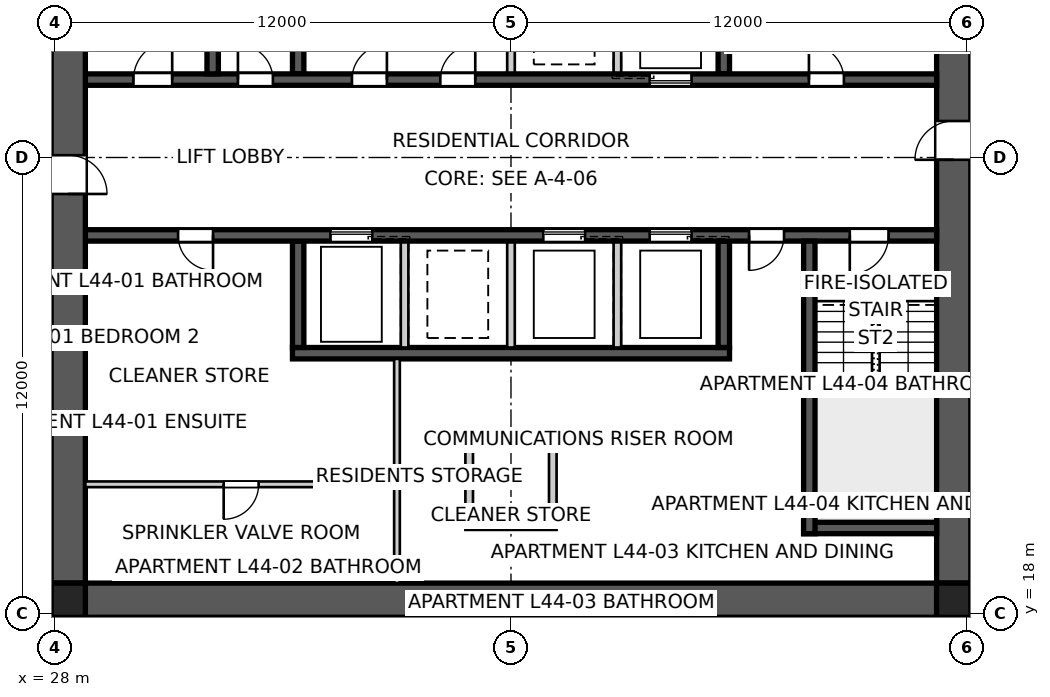
"""IFC4 building model, lengths in metres.
Left out: names, types, materials, properties, quantities, classifications, styles, units other than length and angle.
Written with IfcOpenShell. Run it as: python <this file> out.ifc"""

import sys

from ifc_helpers import new_model, si_unit, direction, frame, frame_2d, origin, origin_2d, place, context, subcontext, project, spatial, polyline, rectangle, outline, extrude, element, fill, save


model = new_model("IFC4")
c1 = context("Model", 3, precision=1e-05, world=origin(), true_north=direction((0.0, 1.0)))
c2 = subcontext(c1, "Body", "Model", "MODEL_VIEW")
j1 = project(units=[si_unit("LENGTHUNIT", "METRE"), si_unit("PLANEANGLEUNIT", "RADIAN")], contexts=[c1])
p1 = place(None, origin())
s1 = spatial("IfcSite", under=j1, at=p1, CompositionType="ELEMENT")
p2 = place(p1, origin())
s2 = spatial("IfcBuilding", under=s1, at=p2, CompositionType="ELEMENT")
p3 = place(p2, frame((0.0, 0.0, 160.8)))
s3 = spatial("IfcBuildingStorey", under=s2, at=p3, CompositionType="ELEMENT", Elevation=160.8)
p4 = place(p3, frame((51.2, 18.35, 0.0), z_axis=(0.0, 0.0, 1.0), x_axis=(-1.0, 0.0, 0.0)))
e1 = element("IfcWall", 1, at=p4, inside=s3, PredefinedType="SHEAR", context=c2, shape_type="SweptSolid", body=[
    extrude(outline(polyline([(0.0, -0.45), (22.4, -0.45), (22.4, -0.025), (22.85, -0.025), (22.85, 0.025), (22.4, 0.025), (22.4, 0.45), (0.0, 0.45), (0.0, 0.025), (-0.45, 0.025), (-0.45, -0.025), (0.0, -0.025), (0.0, -0.45)])), origin(), (0.0, 0.0, 1.0), 3.4),
])
p5 = place(p3, frame((51.65, 18.8, 0.0), z_axis=(0.0, 0.0, 1.0), x_axis=(0.0, 1.0, 0.0)))
e2 = element("IfcWall", 2, at=p5, inside=s3, PredefinedType="SHEAR", context=c2, shape_type="SweptSolid", body=[
    extrude(outline(polyline([(0.0, -0.45), (22.4, -0.45), (22.4, -0.025), (22.85, -0.025), (22.85, 0.025), (22.4, 0.025), (22.4, 0.45), (0.0, 0.45), (0.0, 0.025), (-0.45, 0.025), (-0.45, -0.025), (0.0, -0.025), (0.0, -0.45)])), origin(), (0.0, 0.0, 1.0), 3.4),
])
p6 = place(p5, frame((11.14, 0.0, 0.0)))
e3 = element("IfcOpeningElement", 3, at=p6, cuts=e2, PredefinedType="OPENING", context=c2, shape_type="SweptSolid", body=[
    extrude(rectangle(XDim=1.02, YDim=2.4, at=frame_2d((0.51, 1.2))), frame((0.0, 0.46, 0.0), z_axis=(0.0, -1.0, 0.0), x_axis=(1.0, 0.0, 0.0)), (0.0, 0.0, 1.0), 0.92),
])
p7 = place(p3, frame((28.35, 41.2, 0.0), z_axis=(0.0, 0.0, 1.0), x_axis=(0.0, -1.0, 0.0)))
e4 = element("IfcWall", 4, at=p7, inside=s3, PredefinedType="SHEAR", context=c2, shape_type="SweptSolid", body=[
    extrude(outline(polyline([(0.0, -0.45), (22.4, -0.45), (22.4, -0.025), (22.85, -0.025), (22.85, 0.025), (22.4, 0.025), (22.4, 0.45), (0.0, 0.45), (0.0, 0.025), (-0.45, 0.025), (-0.45, -0.025), (0.0, -0.025), (0.0, -0.45)])), origin(), (0.0, 0.0, 1.0), 3.4),
])
p8 = place(p7, frame((11.14, 0.0, 0.0)))
e5 = element("IfcOpeningElement", 5, at=p8, cuts=e4, PredefinedType="OPENING", context=c2, shape_type="SweptSolid", body=[
    extrude(rectangle(XDim=1.02, YDim=2.4, at=frame_2d((0.51, 1.2))), frame((0.0, 0.46, 0.0), z_axis=(0.0, -1.0, 0.0), x_axis=(1.0, 0.0, 0.0)), (0.0, 0.0, 1.0), 0.92),
])
p9 = place(p3, frame((28.8, 32.05, 0.0), z_axis=(0.0, 0.0, 1.0), x_axis=(1.0, 0.0, 0.0)))
e6 = element("IfcWall", 6, at=p9, inside=s3, PredefinedType="SHEAR", context=c2, shape_type="SweptSolid", body=[
    extrude(rectangle(XDim=22.4, YDim=0.3, at=frame_2d((11.2, 0.0))), origin(), (0.0, 0.0, 1.0), 3.4),
])
p10 = place(p9, frame((19.04, 0.0, 0.0)))
e7 = element("IfcOpeningElement", 7, at=p10, cuts=e6, PredefinedType="OPENING", context=c2, shape_type="SweptSolid", body=[
    extrude(rectangle(XDim=0.92, YDim=2.1, at=frame_2d((0.46, 1.05))), frame((0.0, 0.16, 0.0), z_axis=(0.0, -1.0, 0.0), x_axis=(1.0, 0.0, 0.0)), (0.0, 0.0, 1.0), 0.32),
])
p11 = place(p9, frame((1.265, 0.0, 0.0)))
e8 = element("IfcOpeningElement", 8, at=p11, cuts=e6, PredefinedType="OPENING", context=c2, shape_type="SweptSolid", body=[
    extrude(rectangle(XDim=1.02, YDim=2.1, at=frame_2d((0.51, 1.05))), frame((0.0, 0.16, 0.0), z_axis=(0.0, -1.0, 0.0), x_axis=(1.0, 0.0, 0.0)), (0.0, 0.0, 1.0), 0.32),
])
p12 = place(p9, frame((4.015, 0.0, 0.0)))
e9 = element("IfcOpeningElement", 9, at=p12, cuts=e6, PredefinedType="OPENING", context=c2, shape_type="SweptSolid", body=[
    extrude(rectangle(XDim=0.92, YDim=2.1, at=frame_2d((0.46, 1.05))), frame((0.0, 0.16, 0.0), z_axis=(0.0, -1.0, 0.0), x_axis=(1.0, 0.0, 0.0)), (0.0, 0.0, 1.0), 0.32),
])
p13 = place(p9, frame((7.015, 0.0, 0.0)))
e10 = element("IfcOpeningElement", 10, at=p13, cuts=e6, PredefinedType="OPENING", context=c2, shape_type="SweptSolid", body=[
    extrude(rectangle(XDim=0.92, YDim=2.1, at=frame_2d((0.46, 1.05))), frame((0.0, 0.16, 0.0), z_axis=(0.0, -1.0, 0.0), x_axis=(1.0, 0.0, 0.0)), (0.0, 0.0, 1.0), 0.32),
])
p14 = place(p9, frame((9.34, 0.0, 0.0)))
e11 = element("IfcOpeningElement", 11, at=p14, cuts=e6, PredefinedType="OPENING", context=c2, shape_type="SweptSolid", body=[
    extrude(rectangle(XDim=0.92, YDim=2.1, at=frame_2d((0.46, 1.05))), frame((0.0, 0.16, 0.0), z_axis=(0.0, -1.0, 0.0), x_axis=(1.0, 0.0, 0.0)), (0.0, 0.0, 1.0), 0.32),
])
p15 = place(p9, frame((14.85, 0.0, 0.0)))
e12 = element("IfcOpeningElement", 12, at=p15, cuts=e6, PredefinedType="OPENING", context=c2, shape_type="SweptSolid", body=[
    extrude(rectangle(XDim=1.1, YDim=2.1, at=frame_2d((0.55, 1.05))), frame((0.0, 0.16, 0.0), z_axis=(0.0, -1.0, 0.0), x_axis=(1.0, 0.0, 0.0)), (0.0, 0.0, 1.0), 0.32),
])
p16 = place(p3, frame((51.2, 27.95, 0.0), z_axis=(0.0, 0.0, 1.0), x_axis=(-1.0, 0.0, 0.0)))
e13 = element("IfcWall", 13, at=p16, inside=s3, PredefinedType="SHEAR", context=c2, shape_type="SweptSolid", body=[
    extrude(rectangle(XDim=22.4, YDim=0.3, at=frame_2d((11.2, 0.0))), origin(), (0.0, 0.0, 1.0), 3.4),
])
p17 = place(p16, frame((19.04, 0.0, 0.0)))
e14 = element("IfcOpeningElement", 14, at=p17, cuts=e13, PredefinedType="OPENING", context=c2, shape_type="SweptSolid", body=[
    extrude(rectangle(XDim=0.92, YDim=2.1, at=frame_2d((0.46, 1.05))), frame((0.0, 0.16, 0.0), z_axis=(0.0, -1.0, 0.0), x_axis=(1.0, 0.0, 0.0)), (0.0, 0.0, 1.0), 0.32),
])
p18 = place(p16, frame((1.265, 0.0, 0.0)))
e15 = element("IfcOpeningElement", 15, at=p18, cuts=e13, PredefinedType="OPENING", context=c2, shape_type="SweptSolid", body=[
    extrude(rectangle(XDim=1.02, YDim=2.1, at=frame_2d((0.51, 1.05))), frame((0.0, 0.16, 0.0), z_axis=(0.0, -1.0, 0.0), x_axis=(1.0, 0.0, 0.0)), (0.0, 0.0, 1.0), 0.32),
])
p19 = place(p16, frame((4.015, 0.0, 0.0)))
e16 = element("IfcOpeningElement", 16, at=p19, cuts=e13, PredefinedType="OPENING", context=c2, shape_type="SweptSolid", body=[
    extrude(rectangle(XDim=0.92, YDim=2.1, at=frame_2d((0.46, 1.05))), frame((0.0, 0.16, 0.0), z_axis=(0.0, -1.0, 0.0), x_axis=(1.0, 0.0, 0.0)), (0.0, 0.0, 1.0), 0.32),
])
p20 = place(p16, frame((6.45, 0.0, 0.0)))
e17 = element("IfcOpeningElement", 17, at=p20, cuts=e13, PredefinedType="OPENING", context=c2, shape_type="SweptSolid", body=[
    extrude(rectangle(XDim=1.1, YDim=2.1, at=frame_2d((0.55, 1.05))), frame((0.0, 0.16, 0.0), z_axis=(0.0, -1.0, 0.0), x_axis=(1.0, 0.0, 0.0)), (0.0, 0.0, 1.0), 0.32),
])
p21 = place(p16, frame((9.25, 0.0, 0.0)))
e18 = element("IfcOpeningElement", 18, at=p21, cuts=e13, PredefinedType="OPENING", context=c2, shape_type="SweptSolid", body=[
    extrude(rectangle(XDim=1.1, YDim=2.1, at=frame_2d((0.55, 1.05))), frame((0.0, 0.16, 0.0), z_axis=(0.0, -1.0, 0.0), x_axis=(1.0, 0.0, 0.0)), (0.0, 0.0, 1.0), 0.32),
])
p22 = place(p16, frame((14.85, 0.0, 0.0)))
e19 = element("IfcOpeningElement", 19, at=p22, cuts=e13, PredefinedType="OPENING", context=c2, shape_type="SweptSolid", body=[
    extrude(rectangle(XDim=1.1, YDim=2.1, at=frame_2d((0.55, 1.05))), frame((0.0, 0.16, 0.0), z_axis=(0.0, -1.0, 0.0), x_axis=(1.0, 0.0, 0.0)), (0.0, 0.0, 1.0), 0.32),
])
p23 = place(p3, frame((45.75, 24.85, 0.0), z_axis=(0.0, 0.0, 1.0), x_axis=(-1.0, 0.0, 0.0)))
e20 = element("IfcWall", 20, at=p23, inside=s3, PredefinedType="SHEAR", context=c2, shape_type="SweptSolid", body=[
    extrude(rectangle(XDim=11.5, YDim=0.3, at=frame_2d((5.75, 0.0))), origin(), (0.0, 0.0, 1.0), 3.4),
])
for number, where, z_axis, x_axis in (
    (21, (34.4, 32.2, 0.0), (0.0, 0.0, 1.0), (0.0, 1.0, 0.0)),
    (22, (45.6, 27.8, 0.0), (0.0, 0.0, 1.0), (0.0, -1.0, 0.0)),
):
    element("IfcWall", number, at=place(p3, frame(where, z_axis=z_axis, x_axis=x_axis)), inside=s3, PredefinedType="SHEAR", context=c2, shape_type="SweptSolid", body=[
        extrude(rectangle(XDim=2.8, YDim=0.3, at=frame_2d((1.4, 0.0))), origin(), (0.0, 0.0, 1.0), 3.4),
    ])
for number, where, z_axis, x_axis in (
    (23, (42.8, 27.8, 0.0), (0.0, 0.0, 1.0), (0.0, -1.0, 0.0)),
    (24, (40.0, 32.2, 0.0), (0.0, 0.0, 1.0), (0.0, 1.0, 0.0)),
    (25, (40.0, 27.8, 0.0), (0.0, 0.0, 1.0), (0.0, -1.0, 0.0)),
    (26, (42.8, 32.2, 0.0), (0.0, 0.0, 1.0), (0.0, 1.0, 0.0)),
    (27, (37.2, 27.8, 0.0), (0.0, 0.0, 1.0), (0.0, -1.0, 0.0)),
):
    element("IfcWall", number, at=place(p3, frame(where, z_axis=z_axis, x_axis=x_axis)), inside=s3, PredefinedType="SOLIDWALL", context=c2, shape_type="SweptSolid", body=[
        extrude(rectangle(XDim=2.8, YDim=0.2, at=frame_2d((1.4, 0.0))), origin(), (0.0, 0.0, 1.0), 3.4),
    ])
for number, where, z_axis, x_axis in (
    (28, (45.6, 32.2, 0.0), (0.0, 0.0, 1.0), (0.0, 1.0, 0.0)),
    (29, (34.4, 27.8, 0.0), (0.0, 0.0, 1.0), (0.0, -1.0, 0.0)),
):
    element("IfcWall", number, at=place(p3, frame(where, z_axis=z_axis, x_axis=x_axis)), inside=s3, PredefinedType="SHEAR", context=c2, shape_type="SweptSolid", body=[
        extrude(rectangle(XDim=2.8, YDim=0.3, at=frame_2d((1.4, 0.0))), origin(), (0.0, 0.0, 1.0), 3.4),
    ])
for number, where, z_axis, x_axis in (
    (30, (32.15, 32.2, 0.0), (0.0, 0.0, 1.0), (0.0, 1.0, 0.0)),
    (31, (47.85, 27.8, 0.0), (0.0, 0.0, 1.0), (0.0, -1.0, 0.0)),
):
    element("IfcWall", number, at=place(p3, frame(where, z_axis=z_axis, x_axis=x_axis)), inside=s3, PredefinedType="SHEAR", context=c2, shape_type="SweptSolid", body=[
        extrude(rectangle(XDim=7.7, YDim=0.3, at=frame_2d((3.85, 0.0))), origin(), (0.0, 0.0, 1.0), 3.4),
    ])
p24 = place(p3, frame((51.2, 20.25, 0.0), z_axis=(0.0, 0.0, 1.0), x_axis=(-1.0, 0.0, 0.0)))
e32 = element("IfcWall", 32, at=p24, inside=s3, PredefinedType="SHEAR", context=c2, shape_type="SweptSolid", body=[
    extrude(rectangle(XDim=3.5, YDim=0.3, at=frame_2d((1.75, 0.0))), origin(), (0.0, 0.0, 1.0), 3.4),
])
for number, where, z_axis, x_axis in (
    (33, (38.9, 22.4, 0.0), (0.0, 0.0, 1.0), (0.0, -1.0, 0.0)),
    (34, (41.1, 22.4, 0.0), (0.0, 0.0, 1.0), (0.0, -1.0, 0.0)),
):
    element("IfcWall", number, at=place(p3, frame(where, z_axis=z_axis, x_axis=x_axis)), inside=s3, PredefinedType="SOLIDWALL", context=c2, shape_type="SweptSolid", body=[
        extrude(rectangle(XDim=2.0, YDim=0.2, at=frame_2d((1.0, 0.0))), origin(), (0.0, 0.0, 1.0), 3.4),
    ])
for number, where, z_axis, x_axis in (
    (35, (38.8, 22.5, 0.0), (0.0, 0.0, 1.0), (1.0, 0.0, 0.0)),
    (36, (38.8, 20.3, 0.0), (0.0, 0.0, 1.0), (1.0, 0.0, 0.0)),
):
    element("IfcWall", number, at=place(p3, frame(where, z_axis=z_axis, x_axis=x_axis)), inside=s3, PredefinedType="SOLIDWALL", context=c2, shape_type="SweptSolid", body=[
        extrude(rectangle(XDim=2.4, YDim=0.2, at=frame_2d((1.2, 0.0))), origin(), (0.0, 0.0, 1.0), 3.4),
    ])
for number, where, z_axis, x_axis in (
    (37, (28.35, 18.35, 0.0), (0.0, 0.0, 1.0), (1.0, 0.0, 0.0)),
    (38, (51.65, 18.35, 0.0), (0.0, 0.0, 1.0), (1.0, 0.0, 0.0)),
):
    element("IfcColumn", number, at=place(p3, frame(where, z_axis=z_axis, x_axis=x_axis)), inside=s3, PredefinedType="COLUMN", context=c2, shape_type="SweptSolid", body=[
        extrude(rectangle(XDim=0.9, YDim=0.9, at=origin_2d()), origin(), (0.0, 0.0, 1.0), 3.4),
    ])
p25 = place(p3, frame((37.0, 18.8, 0.0), z_axis=(0.0, 0.0, 1.0), x_axis=(0.0, 1.0, 0.0)))
e39 = element("IfcWall", 39, at=p25, inside=s3, PredefinedType="SOLIDWALL", context=c2, shape_type="SweptSolid", body=[
    extrude(rectangle(XDim=5.9, YDim=0.15, at=frame_2d((2.95, 0.0))), origin(), (0.0, 0.0, 1.0), 3.25),
])
p26 = place(p3, frame((37.0, 21.4, 0.0), z_axis=(0.0, 0.0, 1.0), x_axis=(-1.0, 0.0, 0.0)))
e40 = element("IfcWall", 40, at=p26, inside=s3, PredefinedType="SOLIDWALL", context=c2, shape_type="SweptSolid", body=[
    extrude(rectangle(XDim=8.2, YDim=0.15, at=frame_2d((4.1, 0.0))), origin(), (0.0, 0.0, 1.0), 3.25),
])
p27 = place(p26, frame((3.64, 0.0, 0.0)))
e41 = element("IfcOpeningElement", 41, at=p27, cuts=e40, PredefinedType="OPENING", context=c2, shape_type="SweptSolid", body=[
    extrude(rectangle(XDim=0.92, YDim=2.1, at=frame_2d((0.46, 1.05))), frame((0.0, 0.085, 0.0), z_axis=(0.0, -1.0, 0.0), x_axis=(1.0, 0.0, 0.0)), (0.0, 0.0, 1.0), 0.17),
])
p28 = place(p3, frame((27.9, 17.95, 0.0), z_axis=(0.0, 0.0, 1.0), x_axis=(0.0, -1.0, 0.0)))
e42 = element("IfcWall", 42, at=p28, inside=s3, PredefinedType="PARTITIONING", context=c2, shape_type="SweptSolid", body=[
    extrude(rectangle(XDim=2.3, YDim=0.2, at=frame_2d((1.15, 0.0))), origin(), (0.0, 0.0, 1.0), 3.25),
])
p29 = place(p3, frame((52.1, 15.65, 0.0), z_axis=(0.0, 0.0, 1.0), x_axis=(0.0, 1.0, 0.0)))
e43 = element("IfcWall", 43, at=p29, inside=s3, PredefinedType="PARTITIONING", context=c2, shape_type="SweptSolid", body=[
    extrude(rectangle(XDim=3.17, YDim=0.2, at=frame_2d((1.585, 0.0))), origin(), (0.0, 0.0, 1.0), 3.25),
])
p30 = place(p10, origin())
e44 = element("IfcDoor", 44, at=p30, inside=s3, OperationType="SINGLE_SWING_LEFT", PredefinedType="DOOR", context=c2, shape_type="SweptSolid", body=[
    extrude(rectangle(XDim=0.92, YDim=2.1, at=frame_2d((0.46, 1.05))), frame((0.0, 0.025, 0.0), z_axis=(0.0, -1.0, 0.0), x_axis=(1.0, 0.0, 0.0)), (0.0, 0.0, 1.0), 0.05),
])
fill(e7, e44)
p31 = place(p17, origin())
e45 = element("IfcDoor", 45, at=p31, inside=s3, OperationType="SINGLE_SWING_LEFT", PredefinedType="DOOR", context=c2, shape_type="SweptSolid", body=[
    extrude(rectangle(XDim=0.92, YDim=2.1, at=frame_2d((0.46, 1.05))), frame((0.0, 0.025, 0.0), z_axis=(0.0, -1.0, 0.0), x_axis=(1.0, 0.0, 0.0)), (0.0, 0.0, 1.0), 0.05),
])
fill(e14, e45)
p32 = place(p18, origin())
e46 = element("IfcDoor", 46, at=p32, inside=s3, OperationType="SINGLE_SWING_RIGHT", PredefinedType="DOOR", context=c2, shape_type="SweptSolid", body=[
    extrude(rectangle(XDim=1.02, YDim=2.1, at=frame_2d((0.51, 1.05))), frame((0.0, 0.025, 0.0), z_axis=(0.0, -1.0, 0.0), x_axis=(1.0, 0.0, 0.0)), (0.0, 0.0, 1.0), 0.05),
])
fill(e15, e46)
p33 = place(p11, origin())
e47 = element("IfcDoor", 47, at=p33, inside=s3, OperationType="SINGLE_SWING_RIGHT", PredefinedType="DOOR", context=c2, shape_type="SweptSolid", body=[
    extrude(rectangle(XDim=1.02, YDim=2.1, at=frame_2d((0.51, 1.05))), frame((0.0, 0.025, 0.0), z_axis=(0.0, -1.0, 0.0), x_axis=(1.0, 0.0, 0.0)), (0.0, 0.0, 1.0), 0.05),
])
fill(e8, e47)
p34 = place(p12, origin())
e48 = element("IfcDoor", 48, at=p34, inside=s3, OperationType="SINGLE_SWING_LEFT", PredefinedType="DOOR", context=c2, shape_type="SweptSolid", body=[
    extrude(rectangle(XDim=0.92, YDim=2.1, at=frame_2d((0.46, 1.05))), frame((0.0, 0.025, 0.0), z_axis=(0.0, -1.0, 0.0), x_axis=(1.0, 0.0, 0.0)), (0.0, 0.0, 1.0), 0.05),
])
fill(e9, e48)
p35 = place(p19, origin())
e49 = element("IfcDoor", 49, at=p35, inside=s3, OperationType="SINGLE_SWING_RIGHT", PredefinedType="DOOR", context=c2, shape_type="SweptSolid", body=[
    extrude(rectangle(XDim=0.92, YDim=2.1, at=frame_2d((0.46, 1.05))), frame((0.0, 0.025, 0.0), z_axis=(0.0, -1.0, 0.0), x_axis=(1.0, 0.0, 0.0)), (0.0, 0.0, 1.0), 0.05),
])
fill(e16, e49)
p36 = place(p27, origin())
e50 = element("IfcDoor", 50, at=p36, inside=s3, OperationType="SINGLE_SWING_RIGHT", PredefinedType="DOOR", context=c2, shape_type="SweptSolid", body=[
    extrude(rectangle(XDim=0.92, YDim=2.1, at=frame_2d((0.46, 1.05))), frame((0.0, 0.025, 0.0), z_axis=(0.0, -1.0, 0.0), x_axis=(1.0, 0.0, 0.0)), (0.0, 0.0, 1.0), 0.05),
])
fill(e41, e50)
p37 = place(p13, origin())
e51 = element("IfcDoor", 51, at=p37, inside=s3, OperationType="SINGLE_SWING_RIGHT", PredefinedType="DOOR", context=c2, shape_type="SweptSolid", body=[
    extrude(rectangle(XDim=0.92, YDim=2.1, at=frame_2d((0.46, 1.05))), frame((0.0, 0.025, 0.0), z_axis=(0.0, -1.0, 0.0), x_axis=(1.0, 0.0, 0.0)), (0.0, 0.0, 1.0), 0.05),
])
fill(e10, e51)
p38 = place(p14, origin())
e52 = element("IfcDoor", 52, at=p38, inside=s3, OperationType="SINGLE_SWING_RIGHT", PredefinedType="DOOR", context=c2, shape_type="SweptSolid", body=[
    extrude(rectangle(XDim=0.92, YDim=2.1, at=frame_2d((0.46, 1.05))), frame((0.0, 0.025, 0.0), z_axis=(0.0, -1.0, 0.0), x_axis=(1.0, 0.0, 0.0)), (0.0, 0.0, 1.0), 0.05),
])
fill(e11, e52)
p39 = place(p6, origin())
e53 = element("IfcDoor", 53, at=p39, inside=s3, OperationType="SINGLE_SWING_LEFT", PredefinedType="DOOR", context=c2, shape_type="SweptSolid", body=[
    extrude(rectangle(XDim=1.02, YDim=2.4, at=frame_2d((0.51, 1.2))), frame((0.0, 0.025, 0.0), z_axis=(0.0, -1.0, 0.0), x_axis=(1.0, 0.0, 0.0)), (0.0, 0.0, 1.0), 0.05),
])
fill(e3, e53)
p40 = place(p8, origin())
e54 = element("IfcDoor", 54, at=p40, inside=s3, OperationType="SINGLE_SWING_RIGHT", PredefinedType="DOOR", context=c2, shape_type="SweptSolid", body=[
    extrude(rectangle(XDim=1.02, YDim=2.4, at=frame_2d((0.51, 1.2))), frame((0.0, 0.025, 0.0), z_axis=(0.0, -1.0, 0.0), x_axis=(1.0, 0.0, 0.0)), (0.0, 0.0, 1.0), 0.05),
])
fill(e5, e54)
p41 = place(p20, origin())
e55 = element("IfcDoor", 55, at=p41, inside=s3, OperationType="SLIDING_TO_LEFT", PredefinedType="DOOR", context=c2, shape_type="SweptSolid", body=[
    extrude(rectangle(XDim=1.1, YDim=2.1, at=frame_2d((0.55, 1.05))), frame((0.0, 0.025, 0.0), z_axis=(0.0, -1.0, 0.0), x_axis=(1.0, 0.0, 0.0)), (0.0, 0.0, 1.0), 0.05),
])
fill(e17, e55)
p42 = place(p21, origin())
e56 = element("IfcDoor", 56, at=p42, inside=s3, OperationType="SLIDING_TO_LEFT", PredefinedType="DOOR", context=c2, shape_type="SweptSolid", body=[
    extrude(rectangle(XDim=1.1, YDim=2.1, at=frame_2d((0.55, 1.05))), frame((0.0, 0.025, 0.0), z_axis=(0.0, -1.0, 0.0), x_axis=(1.0, 0.0, 0.0)), (0.0, 0.0, 1.0), 0.05),
])
fill(e18, e56)
p43 = place(p15, origin())
e57 = element("IfcDoor", 57, at=p43, inside=s3, OperationType="SLIDING_TO_LEFT", PredefinedType="DOOR", context=c2, shape_type="SweptSolid", body=[
    extrude(rectangle(XDim=1.1, YDim=2.1, at=frame_2d((0.55, 1.05))), frame((0.0, 0.025, 0.0), z_axis=(0.0, -1.0, 0.0), x_axis=(1.0, 0.0, 0.0)), (0.0, 0.0, 1.0), 0.05),
])
fill(e12, e57)
p44 = place(p22, origin())
e58 = element("IfcDoor", 58, at=p44, inside=s3, OperationType="SLIDING_TO_LEFT", PredefinedType="DOOR", context=c2, shape_type="SweptSolid", body=[
    extrude(rectangle(XDim=1.1, YDim=2.1, at=frame_2d((0.55, 1.05))), frame((0.0, 0.025, 0.0), z_axis=(0.0, -1.0, 0.0), x_axis=(1.0, 0.0, 0.0)), (0.0, 0.0, 1.0), 0.05),
])
fill(e19, e58)
save(model, sys.argv[1])
